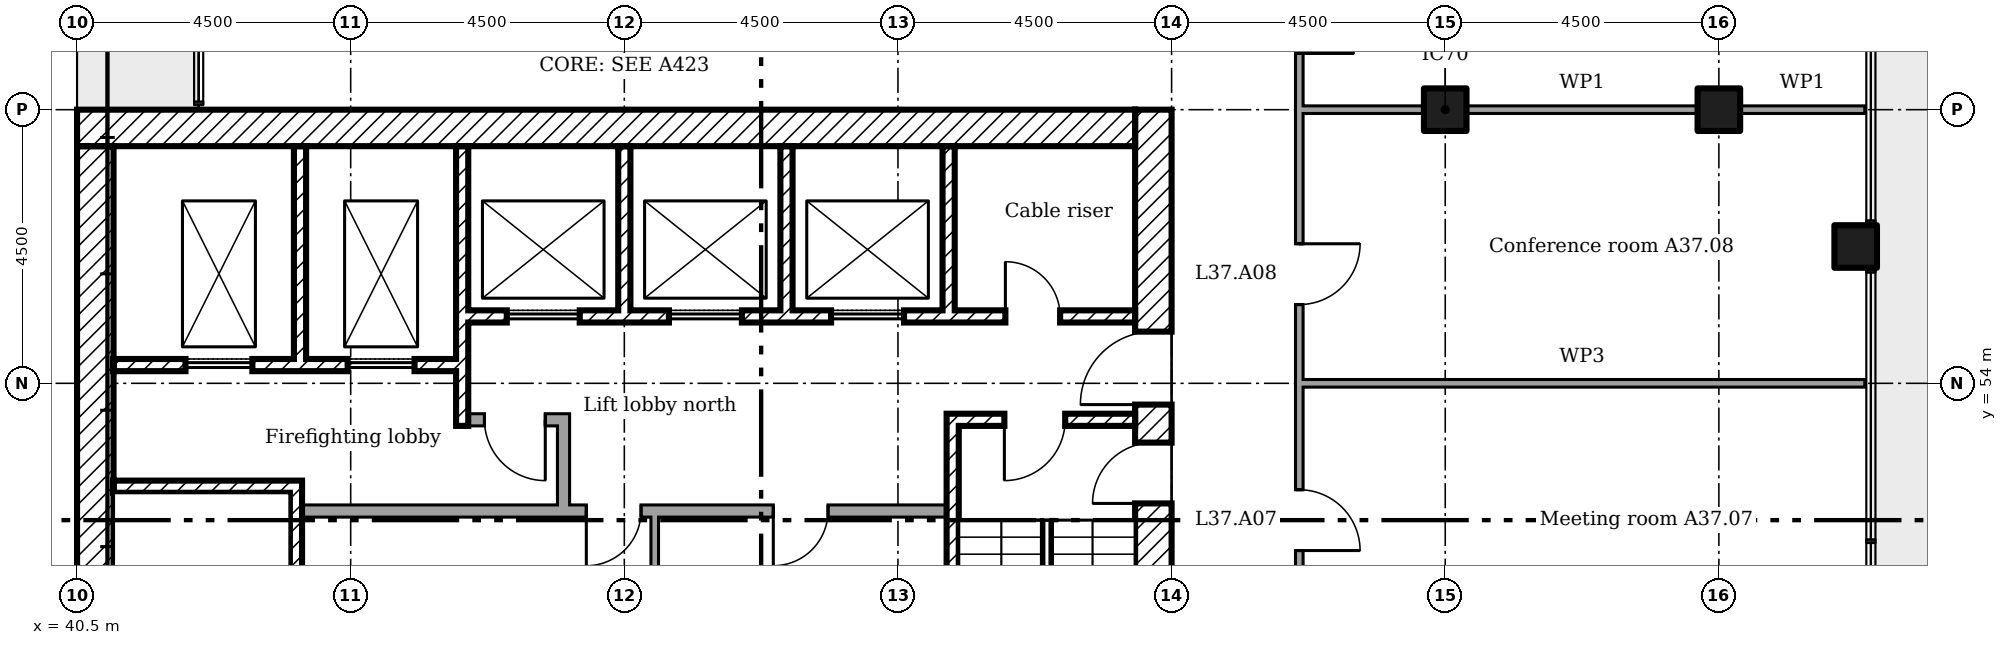
"""IFC4 building model, lengths in metres.
Left out: names, types, materials, properties, quantities, classifications, styles, units other than length and angle.
Written with IfcOpenShell. Run it as: python <this file> out.ifc"""

import sys

from ifc_helpers import new_model, si_unit, direction, frame, frame_2d, origin, origin_2d, place, context, subcontext, project, spatial, rectangle, extrude, element, fill, save


model = new_model("IFC4")
c1 = context("Model", 3, precision=1e-05, world=origin(), true_north=direction((0.0, 1.0)))
c2 = subcontext(c1, "Body", "Model", "MODEL_VIEW")
j1 = project(units=[si_unit("LENGTHUNIT", "METRE"), si_unit("PLANEANGLEUNIT", "RADIAN")], contexts=[c1])
p1 = place(None, origin())
s1 = spatial("IfcSite", under=j1, at=p1, CompositionType="ELEMENT")
p2 = place(p1, origin())
s2 = spatial("IfcBuilding", under=s1, at=p2, CompositionType="ELEMENT")
p3 = place(p2, frame((0.0, 0.0, 151.0)))
s3 = spatial("IfcBuildingStorey", under=s2, at=p3, CompositionType="ELEMENT", Elevation=151.0)
for number, where in (
    (1, (63.0, 58.5, 0.0)),
    (2, (67.5, 58.5, 0.0)),
    (3, (69.75, 56.25, 0.0)),
):
    element("IfcColumn", number, at=place(p3, frame(where)), inside=s3, PredefinedType="COLUMN", context=c2, shape_type="SweptSolid", body=[
        extrude(rectangle(XDim=0.7, YDim=0.7, at=origin_2d()), origin(), (0.0, 0.0, 1.0), 3.6),
    ])
p4 = place(p3, frame((58.2, 40.5, 0.0), z_axis=(0.0, 0.0, 1.0), x_axis=(0.0, 1.0, 0.0)))
e4 = element("IfcWall", 4, at=p4, inside=s3, PredefinedType="SHEAR", context=c2, shape_type="SweptSolid", body=[
    extrude(rectangle(XDim=18.0, YDim=0.6, at=frame_2d((9.0, 0.0))), origin(), (0.0, 0.0, 1.0), 3.35),
])
p5 = place(p4, frame((13.15, 0.0, 0.0)))
e5 = element("IfcOpeningElement", 5, at=p5, cuts=e4, PredefinedType="OPENING", context=c2, shape_type="SweptSolid", body=[
    extrude(rectangle(XDim=1.2, YDim=2.1, at=frame_2d((0.6, 1.05))), frame((0.0, 0.31, 0.0), z_axis=(0.0, -1.0, 0.0), x_axis=(1.0, 0.0, 0.0)), (0.0, 0.0, 1.0), 0.62),
])
p6 = place(p4, frame((3.9, 0.0, 0.0)))
e6 = element("IfcOpeningElement", 6, at=p6, cuts=e4, PredefinedType="OPENING", context=c2, shape_type="SweptSolid", body=[
    extrude(rectangle(XDim=1.8, YDim=2.1, at=frame_2d((0.9, 1.05))), frame((0.0, 0.31, 0.0), z_axis=(0.0, -1.0, 0.0), x_axis=(1.0, 0.0, 0.0)), (0.0, 0.0, 1.0), 0.62),
])
p7 = place(p4, frame((11.525, 0.0, 0.0)))
e7 = element("IfcOpeningElement", 7, at=p7, cuts=e4, PredefinedType="OPENING", context=c2, shape_type="SweptSolid", body=[
    extrude(rectangle(XDim=1.0, YDim=2.1, at=frame_2d((0.5, 1.05))), frame((0.0, 0.31, 0.0), z_axis=(0.0, -1.0, 0.0), x_axis=(1.0, 0.0, 0.0)), (0.0, 0.0, 1.0), 0.62),
])
p8 = place(p3, frame((40.5, 58.2, 0.0)))
e8 = element("IfcWall", 8, at=p8, inside=s3, PredefinedType="SHEAR", context=c2, shape_type="SweptSolid", body=[
    extrude(rectangle(XDim=17.4, YDim=0.6, at=frame_2d((8.7, 0.0))), origin(), (0.0, 0.0, 1.0), 3.35),
])
p9 = place(p3, frame((40.8, 41.1, 0.0), z_axis=(0.0, 0.0, 1.0), x_axis=(0.0, 1.0, 0.0)))
e9 = element("IfcWall", 9, at=p9, inside=s3, PredefinedType="SHEAR", context=c2, shape_type="SweptSolid", body=[
    extrude(rectangle(XDim=16.8, YDim=0.6, at=frame_2d((8.4, 0.0))), origin(), (0.0, 0.0, 1.0), 3.35),
])
p10 = place(p3, frame((44.167, 57.9, 0.0), z_axis=(0.0, 0.0, 1.0), x_axis=(0.0, -1.0, 0.0)))
e10 = element("IfcWall", 10, at=p10, inside=s3, PredefinedType="SHEAR", context=c2, shape_type="SweptSolid", body=[
    extrude(rectangle(XDim=3.5, YDim=0.2, at=frame_2d((1.75, 0.0))), origin(), (0.0, 0.0, 1.0), 3.35),
])
p11 = place(p3, frame((46.833, 57.9, 0.0), z_axis=(0.0, 0.0, 1.0), x_axis=(0.0, -1.0, 0.0)))
e11 = element("IfcWall", 11, at=p11, inside=s3, PredefinedType="SHEAR", context=c2, shape_type="SweptSolid", body=[
    extrude(rectangle(XDim=4.6, YDim=0.2, at=frame_2d((2.3, 0.0))), origin(), (0.0, 0.0, 1.0), 3.35),
])
for number, where, z_axis, x_axis in (
    (12, (49.5, 57.9, 0.0), (0.0, 0.0, 1.0), (0.0, -1.0, 0.0)),
    (13, (52.167, 57.9, 0.0), (0.0, 0.0, 1.0), (0.0, -1.0, 0.0)),
    (14, (54.833, 57.9, 0.0), (0.0, 0.0, 1.0), (0.0, -1.0, 0.0)),
):
    element("IfcWall", number, at=place(p3, frame(where, z_axis=z_axis, x_axis=x_axis)), inside=s3, PredefinedType="SHEAR", context=c2, shape_type="SweptSolid", body=[
        extrude(rectangle(XDim=2.7, YDim=0.2, at=frame_2d((1.35, 0.0))), origin(), (0.0, 0.0, 1.0), 3.35),
    ])
p12 = place(p3, frame((48.5, 51.9, 0.0), z_axis=(0.0, 0.0, 1.0), x_axis=(0.0, 1.0, 0.0)))
e15 = element("IfcWall", 15, at=p12, inside=s3, PredefinedType="PARTITIONING", context=c2, shape_type="SweptSolid", body=[
    extrude(rectangle(XDim=1.6, YDim=0.2, at=frame_2d((0.8, 0.0))), origin(), (0.0, 0.0, 1.0), 3.35),
])
p13 = place(p3, frame((46.933, 53.4, 0.0)))
e16 = element("IfcWall", 16, at=p13, inside=s3, PredefinedType="PARTITIONING", context=c2, shape_type="SweptSolid", body=[
    extrude(rectangle(XDim=1.467, YDim=0.2, at=frame_2d((0.733, 0.0))), origin(), (0.0, 0.0, 1.0), 3.35),
])
p14 = place(p13, frame((0.267, 0.0, 0.0)))
e17 = element("IfcOpeningElement", 17, at=p14, cuts=e16, PredefinedType="OPENING", context=c2, shape_type="SweptSolid", body=[
    extrude(rectangle(XDim=1.0, YDim=2.1, at=frame_2d((0.5, 1.05))), frame((0.0, 0.11, 0.0), z_axis=(0.0, -1.0, 0.0), x_axis=(1.0, 0.0, 0.0)), (0.0, 0.0, 1.0), 0.22),
])
p15 = place(p3, frame((46.933, 55.1, 0.0)))
e18 = element("IfcWall", 18, at=p15, inside=s3, PredefinedType="SHEAR", context=c2, shape_type="SweptSolid", body=[
    extrude(rectangle(XDim=10.967, YDim=0.2, at=frame_2d((5.483, 0.0))), origin(), (0.0, 0.0, 1.0), 3.35),
])
p16 = place(p15, frame((8.833, 0.0, 0.0)))
e19 = element("IfcOpeningElement", 19, at=p16, cuts=e18, PredefinedType="OPENING", context=c2, shape_type="SweptSolid", body=[
    extrude(rectangle(XDim=0.9, YDim=2.1, at=frame_2d((0.45, 1.05))), frame((0.0, 0.11, 0.0), z_axis=(0.0, -1.0, 0.0), x_axis=(1.0, 0.0, 0.0)), (0.0, 0.0, 1.0), 0.22),
])
p17 = place(p15, frame((0.633, 0.0, 0.0)))
e20 = element("IfcOpeningElement", 20, at=p17, cuts=e18, PredefinedType="OPENING", context=c2, shape_type="SweptSolid", body=[
    extrude(rectangle(XDim=1.2, YDim=2.1, at=frame_2d((0.6, 1.05))), frame((0.0, 0.11, 0.0), z_axis=(0.0, -1.0, 0.0), x_axis=(1.0, 0.0, 0.0)), (0.0, 0.0, 1.0), 0.22),
])
p18 = place(p15, frame((3.3, 0.0, 0.0)))
e21 = element("IfcOpeningElement", 21, at=p18, cuts=e18, PredefinedType="OPENING", context=c2, shape_type="SweptSolid", body=[
    extrude(rectangle(XDim=1.2, YDim=2.1, at=frame_2d((0.6, 1.05))), frame((0.0, 0.11, 0.0), z_axis=(0.0, -1.0, 0.0), x_axis=(1.0, 0.0, 0.0)), (0.0, 0.0, 1.0), 0.22),
])
p19 = place(p15, frame((5.967, 0.0, 0.0)))
e22 = element("IfcOpeningElement", 22, at=p19, cuts=e18, PredefinedType="OPENING", context=c2, shape_type="SweptSolid", body=[
    extrude(rectangle(XDim=1.2, YDim=2.1, at=frame_2d((0.6, 1.05))), frame((0.0, 0.11, 0.0), z_axis=(0.0, -1.0, 0.0), x_axis=(1.0, 0.0, 0.0)), (0.0, 0.0, 1.0), 0.22),
])
p20 = place(p3, frame((41.1, 54.3, 0.0)))
e23 = element("IfcWall", 23, at=p20, inside=s3, PredefinedType="SHEAR", context=c2, shape_type="SweptSolid", body=[
    extrude(rectangle(XDim=5.633, YDim=0.2, at=frame_2d((2.817, 0.0))), origin(), (0.0, 0.0, 1.0), 3.35),
])
p21 = place(p20, frame((1.183, 0.0, 0.0)))
e24 = element("IfcOpeningElement", 24, at=p21, cuts=e23, PredefinedType="OPENING", context=c2, shape_type="SweptSolid", body=[
    extrude(rectangle(XDim=1.1, YDim=2.1, at=frame_2d((0.55, 1.05))), frame((0.0, 0.11, 0.0), z_axis=(0.0, -1.0, 0.0), x_axis=(1.0, 0.0, 0.0)), (0.0, 0.0, 1.0), 0.22),
])
p22 = place(p20, frame((3.85, 0.0, 0.0)))
e25 = element("IfcOpeningElement", 25, at=p22, cuts=e23, PredefinedType="OPENING", context=c2, shape_type="SweptSolid", body=[
    extrude(rectangle(XDim=1.1, YDim=2.1, at=frame_2d((0.55, 1.05))), frame((0.0, 0.11, 0.0), z_axis=(0.0, -1.0, 0.0), x_axis=(1.0, 0.0, 0.0)), (0.0, 0.0, 1.0), 0.22),
])
p23 = place(p3, frame((44.1, 45.5, 0.0), z_axis=(0.0, 0.0, 1.0), x_axis=(0.0, 1.0, 0.0)))
e26 = element("IfcWall", 26, at=p23, inside=s3, PredefinedType="SHEAR", context=c2, shape_type="SweptSolid", body=[
    extrude(rectangle(XDim=6.9, YDim=0.2, at=frame_2d((3.45, 0.0))), origin(), (0.0, 0.0, 1.0), 3.35),
])
p24 = place(p3, frame((41.1, 52.3, 0.0)))
e27 = element("IfcWall", 27, at=p24, inside=s3, PredefinedType="SHEAR", context=c2, shape_type="SweptSolid", body=[
    extrude(rectangle(XDim=2.9, YDim=0.2, at=frame_2d((1.45, 0.0))), origin(), (0.0, 0.0, 1.0), 3.35),
])
p25 = place(p3, frame((54.8, 53.4, 0.0)))
e28 = element("IfcWall", 28, at=p25, inside=s3, PredefinedType="SHEAR", context=c2, shape_type="SweptSolid", body=[
    extrude(rectangle(XDim=3.1, YDim=0.2, at=frame_2d((1.55, 0.0))), origin(), (0.0, 0.0, 1.0), 3.35),
])
p26 = place(p25, frame((0.95, 0.0, 0.0)))
e29 = element("IfcOpeningElement", 29, at=p26, cuts=e28, PredefinedType="OPENING", context=c2, shape_type="SweptSolid", body=[
    extrude(rectangle(XDim=1.0, YDim=2.1, at=frame_2d((0.5, 1.05))), frame((0.0, 0.11, 0.0), z_axis=(0.0, -1.0, 0.0), x_axis=(1.0, 0.0, 0.0)), (0.0, 0.0, 1.0), 0.22),
])
p27 = place(p3, frame((54.9, 46.8, 0.0), z_axis=(0.0, 0.0, 1.0), x_axis=(0.0, 1.0, 0.0)))
e30 = element("IfcWall", 30, at=p27, inside=s3, PredefinedType="SHEAR", context=c2, shape_type="SweptSolid", body=[
    extrude(rectangle(XDim=6.5, YDim=0.2, at=frame_2d((3.25, 0.0))), origin(), (0.0, 0.0, 1.0), 3.35),
])
p28 = place(p3, frame((44.2, 51.9, 0.0)))
e31 = element("IfcWall", 31, at=p28, inside=s3, PredefinedType="PARTITIONING", context=c2, shape_type="SweptSolid", body=[
    extrude(rectangle(XDim=10.6, YDim=0.2, at=frame_2d((5.3, 0.0))), origin(), (0.0, 0.0, 1.0), 3.35),
])
p29 = place(p28, frame((4.675, 0.0, 0.0)))
e32 = element("IfcOpeningElement", 32, at=p29, cuts=e31, PredefinedType="OPENING", context=c2, shape_type="SweptSolid", body=[
    extrude(rectangle(XDim=0.9, YDim=2.1, at=frame_2d((0.45, 1.05))), frame((0.0, 0.11, 0.0), z_axis=(0.0, -1.0, 0.0), x_axis=(1.0, 0.0, 0.0)), (0.0, 0.0, 1.0), 0.22),
])
p30 = place(p28, frame((7.75, 0.0, 0.0)))
e33 = element("IfcOpeningElement", 33, at=p30, cuts=e31, PredefinedType="OPENING", context=c2, shape_type="SweptSolid", body=[
    extrude(rectangle(XDim=0.9, YDim=2.1, at=frame_2d((0.45, 1.05))), frame((0.0, 0.11, 0.0), z_axis=(0.0, -1.0, 0.0), x_axis=(1.0, 0.0, 0.0)), (0.0, 0.0, 1.0), 0.22),
])
p31 = place(p3, frame((50.0, 49.163, 0.0), z_axis=(0.0, 0.0, 1.0), x_axis=(0.0, 1.0, 0.0)))
e34 = element("IfcWall", 34, at=p31, inside=s3, PredefinedType="PARTITIONING", context=c2, shape_type="SweptSolid", body=[
    extrude(rectangle(XDim=2.637, YDim=0.125, at=frame_2d((1.319, 0.0))), origin(), (0.0, 0.0, 1.0), 3.35),
])
p32 = place(p3, frame((60.6, 54.0, 0.0)))
e35 = element("IfcWall", 35, at=p32, inside=s3, PredefinedType="MOVABLE", context=c2, shape_type="SweptSolid", body=[
    extrude(rectangle(XDim=9.3, YDim=0.125, at=frame_2d((4.65, 0.0))), origin(), (0.0, 0.0, 1.0), 2.766),
])
p33 = place(p3, frame((60.6, 58.5, 0.0)))
e36 = element("IfcWall", 36, at=p33, inside=s3, PredefinedType="PARTITIONING", context=c2, shape_type="SweptSolid", body=[
    extrude(rectangle(XDim=2.05, YDim=0.125, at=frame_2d((1.025, 0.0))), origin(), (0.0, 0.0, 1.0), 2.676),
])
p34 = place(p3, frame((63.35, 58.5, 0.0)))
e37 = element("IfcWall", 37, at=p34, inside=s3, PredefinedType="PARTITIONING", context=c2, shape_type="SweptSolid", body=[
    extrude(rectangle(XDim=3.8, YDim=0.125, at=frame_2d((1.9, 0.0))), origin(), (0.0, 0.0, 1.0), 2.676),
])
p35 = place(p3, frame((67.85, 58.5, 0.0)))
e38 = element("IfcWall", 38, at=p35, inside=s3, PredefinedType="PARTITIONING", context=c2, shape_type="SweptSolid", body=[
    extrude(rectangle(XDim=2.05, YDim=0.125, at=frame_2d((1.025, 0.0))), origin(), (0.0, 0.0, 1.0), 2.676),
])
p36 = place(p3, frame((60.6, 38.762, 0.0), z_axis=(0.0, 0.0, 1.0), x_axis=(0.0, 1.0, 0.0)))
e39 = element("IfcWall", 39, at=p36, inside=s3, PredefinedType="PARTITIONING", context=c2, shape_type="SweptSolid", body=[
    extrude(rectangle(XDim=22.075, YDim=0.125, at=frame_2d((11.038, 0.0))), origin(), (0.0, 0.0, 1.0), 3.45),
])
p37 = place(p36, frame((3.032, 0.0, 0.0)))
e40 = element("IfcOpeningElement", 40, at=p37, cuts=e39, PredefinedType="OPENING", context=c2, shape_type="SweptSolid", body=[
    extrude(rectangle(XDim=1.0, YDim=2.1, at=frame_2d((0.5, 1.05))), frame((0.0, 0.073, 0.0), z_axis=(0.0, -1.0, 0.0), x_axis=(1.0, 0.0, 0.0)), (0.0, 0.0, 1.0), 0.145),
])
p38 = place(p36, frame((8.442, 0.0, 0.0)))
e41 = element("IfcOpeningElement", 41, at=p38, cuts=e39, PredefinedType="OPENING", context=c2, shape_type="SweptSolid", body=[
    extrude(rectangle(XDim=1.0, YDim=2.1, at=frame_2d((0.5, 1.05))), frame((0.0, 0.073, 0.0), z_axis=(0.0, -1.0, 0.0), x_axis=(1.0, 0.0, 0.0)), (0.0, 0.0, 1.0), 0.145),
])
p39 = place(p36, frame((12.488, 0.0, 0.0)))
e42 = element("IfcOpeningElement", 42, at=p39, cuts=e39, PredefinedType="OPENING", context=c2, shape_type="SweptSolid", body=[
    extrude(rectangle(XDim=1.0, YDim=2.1, at=frame_2d((0.5, 1.05))), frame((0.0, 0.073, 0.0), z_axis=(0.0, -1.0, 0.0), x_axis=(1.0, 0.0, 0.0)), (0.0, 0.0, 1.0), 0.145),
])
p40 = place(p36, frame((16.532, 0.0, 0.0)))
e43 = element("IfcOpeningElement", 43, at=p40, cuts=e39, PredefinedType="OPENING", context=c2, shape_type="SweptSolid", body=[
    extrude(rectangle(XDim=1.0, YDim=2.1, at=frame_2d((0.5, 1.05))), frame((0.0, 0.073, 0.0), z_axis=(0.0, -1.0, 0.0), x_axis=(1.0, 0.0, 0.0)), (0.0, 0.0, 1.0), 0.145),
])
p41 = place(p36, frame((20.663, 0.0, 0.0)))
e44 = element("IfcOpeningElement", 44, at=p41, cuts=e39, PredefinedType="OPENING", context=c2, shape_type="SweptSolid", body=[
    extrude(rectangle(XDim=0.9, YDim=2.1, at=frame_2d((0.45, 1.05))), frame((0.0, 0.073, 0.0), z_axis=(0.0, -1.0, 0.0), x_axis=(1.0, 0.0, 0.0)), (0.0, 0.0, 1.0), 0.145),
])
p42 = place(p5, origin())
e45 = element("IfcDoor", 45, at=p42, inside=s3, OperationType="SINGLE_SWING_RIGHT", PredefinedType="DOOR", context=c2, shape_type="SweptSolid", body=[
    extrude(rectangle(XDim=1.2, YDim=2.1, at=frame_2d((0.6, 1.05))), frame((0.0, 0.025, 0.0), z_axis=(0.0, -1.0, 0.0), x_axis=(1.0, 0.0, 0.0)), (0.0, 0.0, 1.0), 0.05),
])
fill(e5, e45)
p43 = place(p26, frame((1.0, 0.0, 0.0), x_axis=(-1.0, 0.0, 0.0)))
e46 = element("IfcDoor", 46, at=p43, inside=s3, OperationType="SINGLE_SWING_LEFT", PredefinedType="DOOR", context=c2, shape_type="SweptSolid", body=[
    extrude(rectangle(XDim=1.0, YDim=2.1, at=frame_2d((0.5, 1.05))), frame((0.0, 0.025, 0.0), z_axis=(0.0, -1.0, 0.0), x_axis=(1.0, 0.0, 0.0)), (0.0, 0.0, 1.0), 0.05),
])
fill(e29, e46)
p44 = place(p7, origin())
e47 = element("IfcDoor", 47, at=p44, inside=s3, OperationType="SINGLE_SWING_RIGHT", PredefinedType="DOOR", context=c2, shape_type="SweptSolid", body=[
    extrude(rectangle(XDim=1.0, YDim=2.1, at=frame_2d((0.5, 1.05))), frame((0.0, 0.025, 0.0), z_axis=(0.0, -1.0, 0.0), x_axis=(1.0, 0.0, 0.0)), (0.0, 0.0, 1.0), 0.05),
])
fill(e7, e47)
p45 = place(p14, frame((1.0, 0.0, 0.0), x_axis=(-1.0, 0.0, 0.0)))
e48 = element("IfcDoor", 48, at=p45, inside=s3, OperationType="SINGLE_SWING_RIGHT", PredefinedType="DOOR", context=c2, shape_type="SweptSolid", body=[
    extrude(rectangle(XDim=1.0, YDim=2.1, at=frame_2d((0.5, 1.05))), frame((0.0, 0.025, 0.0), z_axis=(0.0, -1.0, 0.0), x_axis=(1.0, 0.0, 0.0)), (0.0, 0.0, 1.0), 0.05),
])
fill(e17, e48)
p46 = place(p16, origin())
e49 = element("IfcDoor", 49, at=p46, inside=s3, OperationType="SINGLE_SWING_RIGHT", PredefinedType="DOOR", context=c2, shape_type="SweptSolid", body=[
    extrude(rectangle(XDim=0.9, YDim=2.1, at=frame_2d((0.45, 1.05))), frame((0.0, 0.025, 0.0), z_axis=(0.0, -1.0, 0.0), x_axis=(1.0, 0.0, 0.0)), (0.0, 0.0, 1.0), 0.05),
])
fill(e19, e49)
p47 = place(p29, frame((0.9, 0.0, 0.0), x_axis=(-1.0, 0.0, 0.0)))
e50 = element("IfcDoor", 50, at=p47, inside=s3, OperationType="SINGLE_SWING_LEFT", PredefinedType="DOOR", context=c2, shape_type="SweptSolid", body=[
    extrude(rectangle(XDim=0.9, YDim=2.1, at=frame_2d((0.45, 1.05))), frame((0.0, 0.025, 0.0), z_axis=(0.0, -1.0, 0.0), x_axis=(1.0, 0.0, 0.0)), (0.0, 0.0, 1.0), 0.05),
])
fill(e32, e50)
p48 = place(p30, frame((0.9, 0.0, 0.0), x_axis=(-1.0, 0.0, 0.0)))
e51 = element("IfcDoor", 51, at=p48, inside=s3, OperationType="SINGLE_SWING_LEFT", PredefinedType="DOOR", context=c2, shape_type="SweptSolid", body=[
    extrude(rectangle(XDim=0.9, YDim=2.1, at=frame_2d((0.45, 1.05))), frame((0.0, 0.025, 0.0), z_axis=(0.0, -1.0, 0.0), x_axis=(1.0, 0.0, 0.0)), (0.0, 0.0, 1.0), 0.05),
])
fill(e33, e51)
p49 = place(p21, origin())
e52 = element("IfcDoor", 52, at=p49, inside=s3, OperationType="SLIDING_TO_LEFT", PredefinedType="DOOR", context=c2, shape_type="SweptSolid", body=[
    extrude(rectangle(XDim=1.1, YDim=2.1, at=frame_2d((0.55, 1.05))), frame((0.0, 0.025, 0.0), z_axis=(0.0, -1.0, 0.0), x_axis=(1.0, 0.0, 0.0)), (0.0, 0.0, 1.0), 0.05),
])
fill(e24, e52)
p50 = place(p22, origin())
e53 = element("IfcDoor", 53, at=p50, inside=s3, OperationType="SLIDING_TO_LEFT", PredefinedType="DOOR", context=c2, shape_type="SweptSolid", body=[
    extrude(rectangle(XDim=1.1, YDim=2.1, at=frame_2d((0.55, 1.05))), frame((0.0, 0.025, 0.0), z_axis=(0.0, -1.0, 0.0), x_axis=(1.0, 0.0, 0.0)), (0.0, 0.0, 1.0), 0.05),
])
fill(e25, e53)
p51 = place(p17, origin())
e54 = element("IfcDoor", 54, at=p51, inside=s3, OperationType="SLIDING_TO_LEFT", PredefinedType="DOOR", context=c2, shape_type="SweptSolid", body=[
    extrude(rectangle(XDim=1.2, YDim=2.1, at=frame_2d((0.6, 1.05))), frame((0.0, 0.025, 0.0), z_axis=(0.0, -1.0, 0.0), x_axis=(1.0, 0.0, 0.0)), (0.0, 0.0, 1.0), 0.05),
])
fill(e20, e54)
p52 = place(p18, origin())
e55 = element("IfcDoor", 55, at=p52, inside=s3, OperationType="SLIDING_TO_LEFT", PredefinedType="DOOR", context=c2, shape_type="SweptSolid", body=[
    extrude(rectangle(XDim=1.2, YDim=2.1, at=frame_2d((0.6, 1.05))), frame((0.0, 0.025, 0.0), z_axis=(0.0, -1.0, 0.0), x_axis=(1.0, 0.0, 0.0)), (0.0, 0.0, 1.0), 0.05),
])
fill(e21, e55)
p53 = place(p19, origin())
e56 = element("IfcDoor", 56, at=p53, inside=s3, OperationType="SLIDING_TO_LEFT", PredefinedType="DOOR", context=c2, shape_type="SweptSolid", body=[
    extrude(rectangle(XDim=1.2, YDim=2.1, at=frame_2d((0.6, 1.05))), frame((0.0, 0.025, 0.0), z_axis=(0.0, -1.0, 0.0), x_axis=(1.0, 0.0, 0.0)), (0.0, 0.0, 1.0), 0.05),
])
fill(e22, e56)
p54 = place(p39, frame((1.0, 0.0, 0.0), x_axis=(-1.0, 0.0, 0.0)))
e57 = element("IfcDoor", 57, at=p54, inside=s3, OperationType="SINGLE_SWING_LEFT", PredefinedType="DOOR", context=c2, shape_type="SweptSolid", body=[
    extrude(rectangle(XDim=1.0, YDim=2.1, at=frame_2d((0.5, 1.05))), frame((0.0, 0.025, 0.0), z_axis=(0.0, -1.0, 0.0), x_axis=(1.0, 0.0, 0.0)), (0.0, 0.0, 1.0), 0.05),
])
fill(e42, e57)
p55 = place(p40, frame((1.0, 0.0, 0.0), x_axis=(-1.0, 0.0, 0.0)))
e58 = element("IfcDoor", 58, at=p55, inside=s3, OperationType="SINGLE_SWING_RIGHT", PredefinedType="DOOR", context=c2, shape_type="SweptSolid", body=[
    extrude(rectangle(XDim=1.0, YDim=2.1, at=frame_2d((0.5, 1.05))), frame((0.0, 0.025, 0.0), z_axis=(0.0, -1.0, 0.0), x_axis=(1.0, 0.0, 0.0)), (0.0, 0.0, 1.0), 0.05),
])
fill(e43, e58)
p56 = place(p41, frame((0.9, 0.0, 0.0), x_axis=(-1.0, 0.0, 0.0)))
e59 = element("IfcDoor", 59, at=p56, inside=s3, OperationType="SINGLE_SWING_LEFT", PredefinedType="DOOR", context=c2, shape_type="SweptSolid", body=[
    extrude(rectangle(XDim=0.9, YDim=2.1, at=frame_2d((0.45, 1.05))), frame((0.0, 0.025, 0.0), z_axis=(0.0, -1.0, 0.0), x_axis=(1.0, 0.0, 0.0)), (0.0, 0.0, 1.0), 0.05),
])
fill(e44, e59)
save(model, sys.argv[1])
